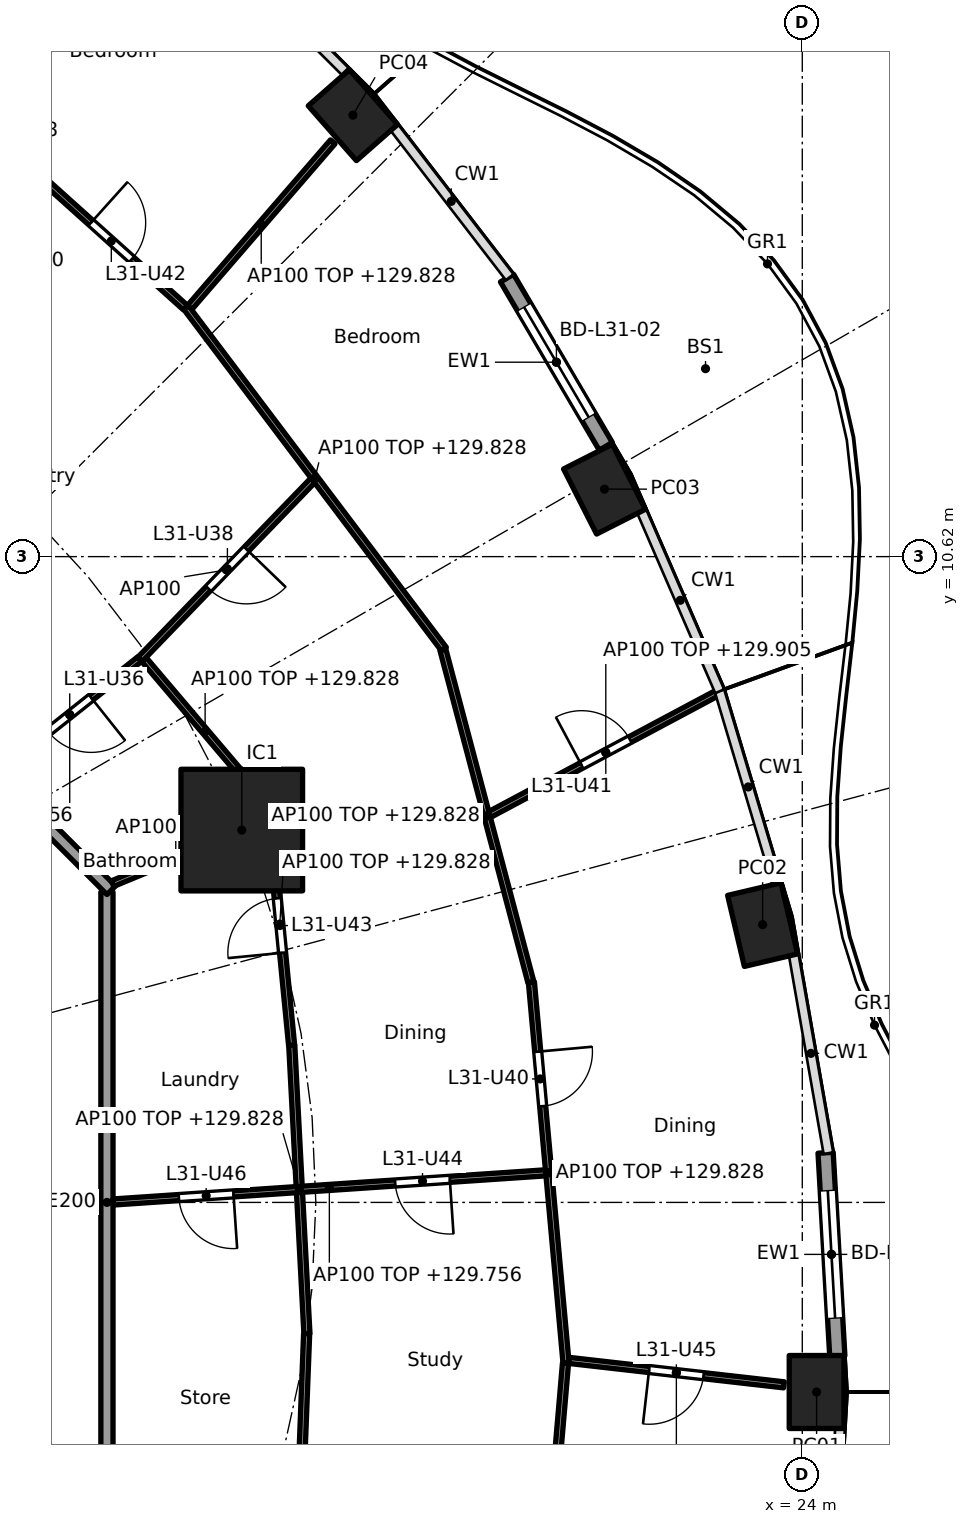
"""IFC4 building model, lengths in metres.
Left out: names, types, materials, properties, quantities, classifications, styles, units other than length and angle.
Written with IfcOpenShell. Run it as: python <this file> out.ifc"""

import sys

from ifc_helpers import new_model, si_unit, direction, frame, frame_2d, origin, origin_2d, place, context, subcontext, project, spatial, rectangle, hollow_rectangle, extrude, element, fill, save


model = new_model("IFC4")
c1 = context("Model", 3, precision=1e-05, world=origin(), true_north=direction((0.0, 1.0)))
c2 = subcontext(c1, "Body", "Model", "MODEL_VIEW")
j1 = project(units=[si_unit("LENGTHUNIT", "METRE"), si_unit("PLANEANGLEUNIT", "RADIAN")], contexts=[c1])
p1 = place(None, origin())
s1 = spatial("IfcSite", under=j1, at=p1, CompositionType="ELEMENT")
p2 = place(p1, origin())
s2 = spatial("IfcBuilding", under=s1, at=p2, CompositionType="ELEMENT")
p3 = place(p2, frame((0.0, 0.0, 127.0)))
s3 = spatial("IfcBuildingStorey", under=s2, at=p3, CompositionType="ELEMENT", Elevation=127.0)
for number, where, z_axis, x_axis in (
    (1, (24.235, -3.118, 0.0), (0.0, 0.0, 1.0), (0.0, 1.0, 0.0)),
    (2, (23.348, 4.568, 0.0), (0.0, 0.0, 1.0), (-0.229, 0.973, 0.0)),
    (3, (20.747, 11.73, 0.0), (0.0, 0.0, 1.0), (-0.452, 0.892, 0.0)),
    (4, (16.61, 17.88, 0.0), (0.0, 0.0, 1.0), (-0.66, 0.751, 0.0)),
):
    element("IfcColumn", number, at=place(p3, frame(where, z_axis=z_axis, x_axis=x_axis)), inside=s3, PredefinedType="COLUMN", context=c2, shape_type="SweptSolid", body=[
        extrude(hollow_rectangle(XDim=1.2, YDim=0.9, WallThickness=0.04, at=origin_2d()), origin(), (0.0, 0.0, 1.0), 3.7),
    ])
p4 = place(p3, frame((14.782, 6.123, 0.0), z_axis=(0.0, 0.0, 1.0), x_axis=(1.0, 0.0, 0.0)))
e5 = element("IfcColumn", 5, at=p4, inside=s3, PredefinedType="COLUMN", context=c2, shape_type="SweptSolid", body=[
    extrude(rectangle(XDim=2.0, YDim=2.0, at=origin_2d()), origin(), (0.0, 0.0, 1.0), 3.7),
])
p5 = place(p3, frame((24.383, 0.816, 0.0), z_axis=(0.0, 0.0, 1.0), x_axis=(0.05746514539, -0.998347513176, 0.0)))
e6 = element("IfcWall", 6, at=p5, inside=s3, PredefinedType="SOLIDWALL", context=c2, shape_type="SweptSolid", body=[
    extrude(rectangle(XDim=3.348, YDim=0.25, at=frame_2d((1.674, 0.0))), origin(), (0.0, 0.0, 1.0), 3.44),
])
p6 = place(p5, frame((0.624, 0.0, 0.0)))
e7 = element("IfcOpeningElement", 7, at=p6, cuts=e6, PredefinedType="OPENING", context=c2, shape_type="SweptSolid", body=[
    extrude(rectangle(XDim=2.1, YDim=2.4, at=frame_2d((1.05, 1.2))), frame((0.0, 0.135, 0.0), z_axis=(0.0, -1.0, 0.0), x_axis=(1.0, 0.0, 0.0)), (0.0, 0.0, 1.0), 0.27),
])
p7 = place(p3, frame((19.144, 15.201, 0.0), z_axis=(0.0, 0.0, 1.0), x_axis=(0.506314982873, -0.862348617508, 0.0)))
e8 = element("IfcWall", 8, at=p7, inside=s3, PredefinedType="SOLIDWALL", context=c2, shape_type="SweptSolid", body=[
    extrude(rectangle(XDim=3.208, YDim=0.25, at=frame_2d((1.604, 0.0))), origin(), (0.0, 0.0, 1.0), 3.44),
])
p8 = place(p7, frame((0.554, 0.0, 0.0)))
e9 = element("IfcOpeningElement", 9, at=p8, cuts=e8, PredefinedType="OPENING", context=c2, shape_type="SweptSolid", body=[
    extrude(rectangle(XDim=2.1, YDim=2.4, at=frame_2d((1.05, 1.2))), frame((0.0, 0.135, 0.0), z_axis=(0.0, -1.0, 0.0), x_axis=(1.0, 0.0, 0.0)), (0.0, 0.0, 1.0), 0.27),
])
p9 = place(p3, frame((12.565, -5.104, 0.0), z_axis=(0.0, 0.0, 1.0), x_axis=(0.0, 1.0, 0.0)))
e10 = element("IfcWall", 10, at=p9, inside=s3, PredefinedType="PARTITIONING", context=c2, shape_type="SweptSolid", body=[
    extrude(rectangle(XDim=10.209, YDim=0.2, at=frame_2d((5.104, 0.0))), origin(), (0.0, 0.0, 1.0), 3.44),
])
p10 = place(p3, frame((12.635, 5.134, 0.0), z_axis=(0.0, 0.0, 1.0), x_axis=(-0.707106781187, 0.707106781187, 0.0)))
e11 = element("IfcWall", 11, at=p10, inside=s3, PredefinedType="PARTITIONING", context=c2, shape_type="SweptSolid", body=[
    extrude(rectangle(XDim=10.609, YDim=0.2, at=frame_2d((5.305, 0.0))), origin(), (0.0, 0.0, 1.0), 3.44),
])
p11 = place(p10, frame((4.804, 0.0, 0.0)))
e12 = element("IfcOpeningElement", 12, at=p11, cuts=e11, PredefinedType="OPENING", context=c2, shape_type="SweptSolid", body=[
    extrude(rectangle(XDim=1.0, YDim=2.1, at=frame_2d((0.5, 1.05))), frame((0.0, 0.11, 0.0), z_axis=(0.0, -1.0, 0.0), x_axis=(1.0, 0.0, 0.0)), (0.0, 0.0, 1.0), 0.22),
])
p12 = place(p3, frame((15.853, -2.158, 0.0), z_axis=(0.0, 0.0, 1.0), x_axis=(-0.052483289253, 0.99862180246, 0.0)))
e13 = element("IfcWall", 13, at=p12, inside=s3, PredefinedType="PARTITIONING", context=c2, shape_type="SweptSolid", body=[
    extrude(rectangle(XDim=4.75, YDim=0.1, at=frame_2d((2.375, 0.0))), origin(), (0.0, 0.0, 1.0), 2.828),
])
p13 = place(p3, frame((15.849, -2.158, 0.0), z_axis=(0.0, 0.0, 1.0), x_axis=(-0.038390448414, -0.999262815014, 0.0)))
e14 = element("IfcWall", 14, at=p13, inside=s3, PredefinedType="PARTITIONING", context=c2, shape_type="SweptSolid", body=[
    extrude(rectangle(XDim=4.394, YDim=0.1, at=frame_2d((2.197, 0.0))), origin(), (0.0, 0.0, 1.0), 3.44),
])
p14 = place(p3, frame((20.16, -2.598, 0.0), z_axis=(0.0, 0.0, 1.0), x_axis=(0.993610673305, -0.112861994911, 0.0)))
e15 = element("IfcWall", 15, at=p14, inside=s3, PredefinedType="PARTITIONING", context=c2, shape_type="SweptSolid", body=[
    extrude(rectangle(XDim=3.561, YDim=0.1, at=frame_2d((1.78, 0.0))), origin(), (0.0, 0.0, 1.0), 2.828),
])
p15 = place(p14, frame((1.33, 0.0, 0.0)))
e16 = element("IfcOpeningElement", 16, at=p15, cuts=e15, PredefinedType="OPENING", context=c2, shape_type="SweptSolid", body=[
    extrude(rectangle(XDim=0.9, YDim=2.1, at=frame_2d((0.45, 1.05))), frame((0.0, 0.06, 0.0), z_axis=(0.0, -1.0, 0.0), x_axis=(1.0, 0.0, 0.0)), (0.0, 0.0, 1.0), 0.12),
])
p16 = place(p3, frame((20.115, -2.642, 0.0), z_axis=(0.0, 0.0, 1.0), x_axis=(-0.090563746294, 0.995890660593, 0.0)))
e17 = element("IfcWall", 17, at=p16, inside=s3, PredefinedType="PARTITIONING", context=c2, shape_type="SweptSolid", body=[
    extrude(rectangle(XDim=6.289, YDim=0.1, at=frame_2d((3.145, 0.0))), origin(), (0.0, 0.0, 1.0), 2.828),
])
p17 = place(p16, frame((4.242, 0.0, 0.0)))
e18 = element("IfcOpeningElement", 18, at=p17, cuts=e17, PredefinedType="OPENING", context=c2, shape_type="SweptSolid", body=[
    extrude(rectangle(XDim=0.9, YDim=2.1, at=frame_2d((0.45, 1.05))), frame((0.0, 0.06, 0.0), z_axis=(0.0, -1.0, 0.0), x_axis=(1.0, 0.0, 0.0)), (0.0, 0.0, 1.0), 0.12),
])
p18 = place(p3, frame((20.106, -2.642, 0.0), z_axis=(0.0, 0.0, 1.0), x_axis=(-0.085672025822, -0.996323393277, 0.0)))
e19 = element("IfcWall", 19, at=p18, inside=s3, PredefinedType="PARTITIONING", context=c2, shape_type="SweptSolid", body=[
    extrude(rectangle(XDim=6.007, YDim=0.1, at=frame_2d((3.003, 0.0))), origin(), (0.0, 0.0, 1.0), 2.828),
])
p19 = place(p3, frame((12.665, 0.007, 0.0), z_axis=(0.0, 0.0, 1.0), x_axis=(0.997737186236, 0.067234717233, 0.0)))
e20 = element("IfcWall", 20, at=p19, inside=s3, PredefinedType="PARTITIONING", context=c2, shape_type="SweptSolid", body=[
    extrude(rectangle(XDim=7.132, YDim=0.1, at=frame_2d((3.566, 0.0))), origin(), (0.0, 0.0, 1.0), 2.756),
])
p20 = place(p19, frame((4.651, 0.0, 0.0)))
e21 = element("IfcOpeningElement", 21, at=p20, cuts=e20, PredefinedType="OPENING", context=c2, shape_type="SweptSolid", body=[
    extrude(rectangle(XDim=0.9, YDim=2.1, at=frame_2d((0.45, 1.05))), frame((0.0, 0.06, 0.0), z_axis=(0.0, -1.0, 0.0), x_axis=(1.0, 0.0, 0.0)), (0.0, 0.0, 1.0), 0.12),
])
p21 = place(p19, frame((1.085, 0.0, 0.0)))
e22 = element("IfcOpeningElement", 22, at=p21, cuts=e20, PredefinedType="OPENING", context=c2, shape_type="SweptSolid", body=[
    extrude(rectangle(XDim=0.9, YDim=2.1, at=frame_2d((0.45, 1.05))), frame((0.0, 0.06, 0.0), z_axis=(0.0, -1.0, 0.0), x_axis=(1.0, 0.0, 0.0)), (0.0, 0.0, 1.0), 0.12),
])
p22 = place(p3, frame((15.602, 2.584, 0.0), z_axis=(0.0, 0.0, 1.0), x_axis=(-0.097216297846, 0.995263277446, 0.0)))
e23 = element("IfcWall", 23, at=p22, inside=s3, PredefinedType="PARTITIONING", context=c2, shape_type="SweptSolid", body=[
    extrude(rectangle(XDim=4.006, YDim=0.1, at=frame_2d((2.003, 0.0))), origin(), (0.0, 0.0, 1.0), 2.828),
])
p23 = place(p22, frame((1.528, 0.0, 0.0)))
e24 = element("IfcOpeningElement", 24, at=p23, cuts=e23, PredefinedType="OPENING", context=c2, shape_type="SweptSolid", body=[
    extrude(rectangle(XDim=0.9, YDim=2.1, at=frame_2d((0.45, 1.05))), frame((0.0, 0.06, 0.0), z_axis=(0.0, -1.0, 0.0), x_axis=(1.0, 0.0, 0.0)), (0.0, 0.0, 1.0), 0.12),
])
p24 = place(p3, frame((19.537, 3.62, 0.0), z_axis=(0.0, 0.0, 1.0), x_axis=(-0.255892560316, 0.966705227862, 0.0)))
e25 = element("IfcWall", 25, at=p24, inside=s3, PredefinedType="PARTITIONING", context=c2, shape_type="SweptSolid", body=[
    extrude(rectangle(XDim=5.659, YDim=0.1, at=frame_2d((2.829, 0.0))), origin(), (0.0, 0.0, 1.0), 2.828),
])
p25 = place(p3, frame((18.857, 6.378, 0.0), z_axis=(0.0, 0.0, 1.0), x_axis=(0.882223462934, 0.470830926607, 0.0)))
e26 = element("IfcWall", 26, at=p25, inside=s3, PredefinedType="PARTITIONING", context=c2, shape_type="SweptSolid", body=[
    extrude(rectangle(XDim=4.333, YDim=0.1, at=frame_2d((2.167, 0.0))), origin(), (0.0, 0.0, 1.0), 2.905),
])
p26 = place(p25, frame((1.717, 0.0, 0.0)))
e27 = element("IfcOpeningElement", 27, at=p26, cuts=e26, PredefinedType="OPENING", context=c2, shape_type="SweptSolid", body=[
    extrude(rectangle(XDim=0.9, YDim=2.1, at=frame_2d((0.45, 1.05))), frame((0.0, 0.06, 0.0), z_axis=(0.0, -1.0, 0.0), x_axis=(1.0, 0.0, 0.0)), (0.0, 0.0, 1.0), 0.12),
])
p27 = place(p3, frame((12.657, 5.243, 0.0), z_axis=(0.0, 0.0, 1.0), x_axis=(0.923864733477, 0.382719158442, 0.0)))
e28 = element("IfcWall", 28, at=p27, inside=s3, PredefinedType="PARTITIONING", context=c2, shape_type="SweptSolid", body=[
    extrude(rectangle(XDim=2.25, YDim=0.1, at=frame_2d((1.125, 0.0))), origin(), (0.0, 0.0, 1.0), 3.44),
])
p28 = place(p3, frame((15.185, 6.559, 0.0), z_axis=(0.0, 0.0, 1.0), x_axis=(-0.647360926376, 0.762183594026, 0.0)))
e29 = element("IfcWall", 29, at=p28, inside=s3, PredefinedType="PARTITIONING", context=c2, shape_type="SweptSolid", body=[
    extrude(rectangle(XDim=3.106, YDim=0.1, at=frame_2d((1.553, 0.0))), origin(), (0.0, 0.0, 1.0), 2.828),
])
p29 = place(p3, frame((18.106, 9.098, 0.0), z_axis=(0.0, 0.0, 1.0), x_axis=(-0.602398572907, 0.798195439325, 0.0)))
e30 = element("IfcWall", 30, at=p29, inside=s3, PredefinedType="PARTITIONING", context=c2, shape_type="SweptSolid", body=[
    extrude(rectangle(XDim=7.044, YDim=0.1, at=frame_2d((3.522, 0.0))), origin(), (0.0, 0.0, 1.0), 2.828),
])
p30 = place(p3, frame((10.803, 7.107, 0.0), z_axis=(0.0, 0.0, 1.0), x_axis=(0.782908385935, 0.622137010017, 0.0)))
e31 = element("IfcWall", 31, at=p30, inside=s3, PredefinedType="PARTITIONING", context=c2, shape_type="SweptSolid", body=[
    extrude(rectangle(XDim=2.937, YDim=0.1, at=frame_2d((1.469, 0.0))), origin(), (0.0, 0.0, 1.0), 2.756),
])
p31 = place(p30, frame((1.019, 0.0, 0.0)))
e32 = element("IfcOpeningElement", 32, at=p31, cuts=e31, PredefinedType="OPENING", context=c2, shape_type="SweptSolid", body=[
    extrude(rectangle(XDim=0.9, YDim=2.1, at=frame_2d((0.45, 1.05))), frame((0.0, 0.06, 0.0), z_axis=(0.0, -1.0, 0.0), x_axis=(1.0, 0.0, 0.0)), (0.0, 0.0, 1.0), 0.12),
])
p32 = place(p3, frame((13.107, 8.929, 0.0), z_axis=(0.0, 0.0, 1.0), x_axis=(0.694592384931, 0.719403515974, 0.0)))
e33 = element("IfcWall", 33, at=p32, inside=s3, PredefinedType="PARTITIONING", context=c2, shape_type="SweptSolid", body=[
    extrude(rectangle(XDim=4.094, YDim=0.1, at=frame_2d((2.047, 0.0))), origin(), (0.0, 0.0, 1.0), 3.44),
])
p33 = place(p32, frame((1.622, 0.0, 0.0)))
e34 = element("IfcOpeningElement", 34, at=p33, cuts=e33, PredefinedType="OPENING", context=c2, shape_type="SweptSolid", body=[
    extrude(rectangle(XDim=0.9, YDim=2.1, at=frame_2d((0.45, 1.05))), frame((0.0, 0.06, 0.0), z_axis=(0.0, -1.0, 0.0), x_axis=(1.0, 0.0, 0.0)), (0.0, 0.0, 1.0), 0.12),
])
p34 = place(p3, frame((13.926, 14.719, 0.0), z_axis=(0.0, 0.0, 1.0), x_axis=(0.653831857253, 0.756639876323, 0.0)))
e35 = element("IfcWall", 35, at=p34, inside=s3, PredefinedType="PARTITIONING", context=c2, shape_type="SweptSolid", body=[
    extrude(rectangle(XDim=3.598, YDim=0.1, at=frame_2d((1.799, 0.0))), origin(), (0.0, 0.0, 1.0), 2.828),
])
p35 = place(p3, frame((13.856, 14.714, 0.0), z_axis=(0.0, 0.0, 1.0), x_axis=(-0.743799395746, 0.668402916577, 0.0)))
e36 = element("IfcWall", 36, at=p35, inside=s3, PredefinedType="PARTITIONING", context=c2, shape_type="SweptSolid", body=[
    extrude(rectangle(XDim=6.509, YDim=0.1, at=frame_2d((3.254, 0.0))), origin(), (0.0, 0.0, 1.0), 2.828),
])
p36 = place(p35, frame((1.19, 0.0, 0.0)))
e37 = element("IfcOpeningElement", 37, at=p36, cuts=e36, PredefinedType="OPENING", context=c2, shape_type="SweptSolid", body=[
    extrude(rectangle(XDim=0.9, YDim=2.1, at=frame_2d((0.45, 1.05))), frame((0.0, 0.06, 0.0), z_axis=(0.0, -1.0, 0.0), x_axis=(1.0, 0.0, 0.0)), (0.0, 0.0, 1.0), 0.12),
])
p37 = place(p6, origin())
e38 = element("IfcDoor", 38, at=p37, inside=s3, OperationType="SLIDING_TO_LEFT", PredefinedType="DOOR", context=c2, shape_type="SweptSolid", body=[
    extrude(rectangle(XDim=2.1, YDim=2.4, at=frame_2d((1.05, 1.2))), frame((0.0, 0.025, 0.0), z_axis=(0.0, -1.0, 0.0), x_axis=(1.0, 0.0, 0.0)), (0.0, 0.0, 1.0), 0.05),
])
fill(e7, e38)
p38 = place(p8, origin())
e39 = element("IfcDoor", 39, at=p38, inside=s3, OperationType="SLIDING_TO_LEFT", PredefinedType="DOOR", context=c2, shape_type="SweptSolid", body=[
    extrude(rectangle(XDim=2.1, YDim=2.4, at=frame_2d((1.05, 1.2))), frame((0.0, 0.025, 0.0), z_axis=(0.0, -1.0, 0.0), x_axis=(1.0, 0.0, 0.0)), (0.0, 0.0, 1.0), 0.05),
])
fill(e9, e39)
p39 = place(p31, frame((0.9, 0.0, 0.0), x_axis=(-1.0, 0.0, 0.0)))
e40 = element("IfcDoor", 40, at=p39, inside=s3, OperationType="SINGLE_SWING_LEFT", PredefinedType="DOOR", context=c2, shape_type="SweptSolid", body=[
    extrude(rectangle(XDim=0.9, YDim=2.1, at=frame_2d((0.45, 1.05))), frame((0.0, 0.025, 0.0), z_axis=(0.0, -1.0, 0.0), x_axis=(1.0, 0.0, 0.0)), (0.0, 0.0, 1.0), 0.05),
])
fill(e32, e40)
p40 = place(p33, frame((0.9, 0.0, 0.0), x_axis=(-1.0, 0.0, 0.0)))
e41 = element("IfcDoor", 41, at=p40, inside=s3, OperationType="SINGLE_SWING_LEFT", PredefinedType="DOOR", context=c2, shape_type="SweptSolid", body=[
    extrude(rectangle(XDim=0.9, YDim=2.1, at=frame_2d((0.45, 1.05))), frame((0.0, 0.025, 0.0), z_axis=(0.0, -1.0, 0.0), x_axis=(1.0, 0.0, 0.0)), (0.0, 0.0, 1.0), 0.05),
])
fill(e34, e41)
p41 = place(p17, frame((0.9, 0.0, 0.0), x_axis=(-1.0, 0.0, 0.0)))
e42 = element("IfcDoor", 42, at=p41, inside=s3, OperationType="SINGLE_SWING_LEFT", PredefinedType="DOOR", context=c2, shape_type="SweptSolid", body=[
    extrude(rectangle(XDim=0.9, YDim=2.1, at=frame_2d((0.45, 1.05))), frame((0.0, 0.025, 0.0), z_axis=(0.0, -1.0, 0.0), x_axis=(1.0, 0.0, 0.0)), (0.0, 0.0, 1.0), 0.05),
])
fill(e18, e42)
p42 = place(p26, origin())
e43 = element("IfcDoor", 43, at=p42, inside=s3, OperationType="SINGLE_SWING_LEFT", PredefinedType="DOOR", context=c2, shape_type="SweptSolid", body=[
    extrude(rectangle(XDim=0.9, YDim=2.1, at=frame_2d((0.45, 1.05))), frame((0.0, 0.025, 0.0), z_axis=(0.0, -1.0, 0.0), x_axis=(1.0, 0.0, 0.0)), (0.0, 0.0, 1.0), 0.05),
])
fill(e27, e43)
p43 = place(p36, frame((0.9, 0.0, 0.0), x_axis=(-1.0, 0.0, 0.0)))
e44 = element("IfcDoor", 44, at=p43, inside=s3, OperationType="SINGLE_SWING_LEFT", PredefinedType="DOOR", context=c2, shape_type="SweptSolid", body=[
    extrude(rectangle(XDim=0.9, YDim=2.1, at=frame_2d((0.45, 1.05))), frame((0.0, 0.025, 0.0), z_axis=(0.0, -1.0, 0.0), x_axis=(1.0, 0.0, 0.0)), (0.0, 0.0, 1.0), 0.05),
])
fill(e37, e44)
p44 = place(p23, origin())
e45 = element("IfcDoor", 45, at=p44, inside=s3, OperationType="SINGLE_SWING_LEFT", PredefinedType="DOOR", context=c2, shape_type="SweptSolid", body=[
    extrude(rectangle(XDim=0.9, YDim=2.1, at=frame_2d((0.45, 1.05))), frame((0.0, 0.025, 0.0), z_axis=(0.0, -1.0, 0.0), x_axis=(1.0, 0.0, 0.0)), (0.0, 0.0, 1.0), 0.05),
])
fill(e24, e45)
p45 = place(p20, frame((0.9, 0.0, 0.0), x_axis=(-1.0, 0.0, 0.0)))
e46 = element("IfcDoor", 46, at=p45, inside=s3, OperationType="SINGLE_SWING_LEFT", PredefinedType="DOOR", context=c2, shape_type="SweptSolid", body=[
    extrude(rectangle(XDim=0.9, YDim=2.1, at=frame_2d((0.45, 1.05))), frame((0.0, 0.025, 0.0), z_axis=(0.0, -1.0, 0.0), x_axis=(1.0, 0.0, 0.0)), (0.0, 0.0, 1.0), 0.05),
])
fill(e21, e46)
p46 = place(p15, frame((0.9, 0.0, 0.0), x_axis=(-1.0, 0.0, 0.0)))
e47 = element("IfcDoor", 47, at=p46, inside=s3, OperationType="SINGLE_SWING_RIGHT", PredefinedType="DOOR", context=c2, shape_type="SweptSolid", body=[
    extrude(rectangle(XDim=0.9, YDim=2.1, at=frame_2d((0.45, 1.05))), frame((0.0, 0.025, 0.0), z_axis=(0.0, -1.0, 0.0), x_axis=(1.0, 0.0, 0.0)), (0.0, 0.0, 1.0), 0.05),
])
fill(e16, e47)
p47 = place(p21, frame((0.9, 0.0, 0.0), x_axis=(-1.0, 0.0, 0.0)))
e48 = element("IfcDoor", 48, at=p47, inside=s3, OperationType="SINGLE_SWING_LEFT", PredefinedType="DOOR", context=c2, shape_type="SweptSolid", body=[
    extrude(rectangle(XDim=0.9, YDim=2.1, at=frame_2d((0.45, 1.05))), frame((0.0, 0.025, 0.0), z_axis=(0.0, -1.0, 0.0), x_axis=(1.0, 0.0, 0.0)), (0.0, 0.0, 1.0), 0.05),
])
fill(e22, e48)
save(model, sys.argv[1])
